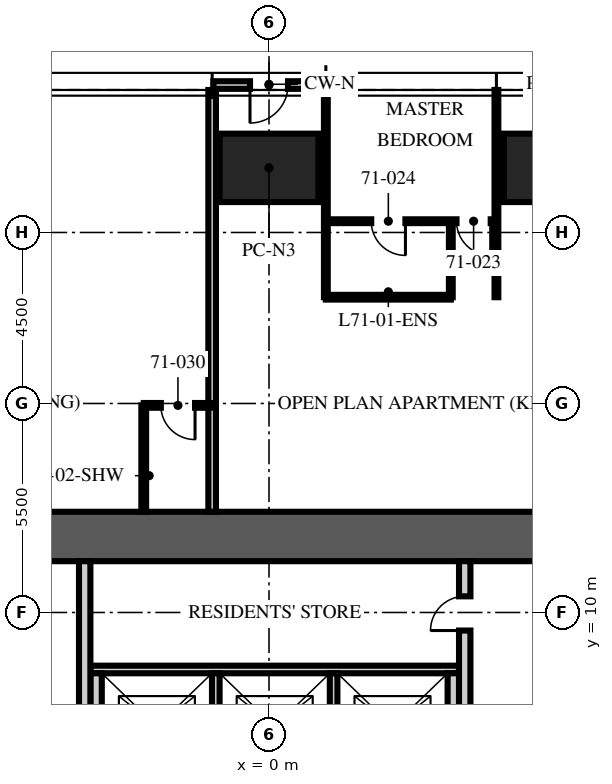
"""IFC4 building model, lengths in metres.
Left out: names, types, materials, properties, quantities, classifications, styles, units other than length and angle.
Written with IfcOpenShell. Run it as: python <this file> out.ifc"""

import sys

from ifc_helpers import new_model, si_unit, direction, frame, frame_2d, origin, origin_2d, place, context, subcontext, project, spatial, rectangle, extrude, element, fill, save


model = new_model("IFC4")
c1 = context("Model", 3, precision=1e-05, world=origin(), true_north=direction((0.0, 1.0)))
c2 = subcontext(c1, "Body", "Model", "MODEL_VIEW")
j1 = project(units=[si_unit("LENGTHUNIT", "METRE"), si_unit("PLANEANGLEUNIT", "RADIAN")], contexts=[c1])
p1 = place(None, origin())
s1 = spatial("IfcSite", under=j1, at=p1, CompositionType="ELEMENT")
p2 = place(p1, origin())
s2 = spatial("IfcBuilding", under=s1, at=p2, CompositionType="ELEMENT")
p3 = place(p2, frame((0.0, 0.0, 285.75)))
s3 = spatial("IfcBuildingStorey", under=s2, at=p3, CompositionType="ELEMENT", Elevation=285.75)
p4 = place(p3, frame((-15.5, 12.0, -0.25), z_axis=(0.0, 0.0, 1.0), x_axis=(1.0, 0.0, 0.0)))
e1 = element("IfcWall", 1, at=p4, inside=s3, PredefinedType="SHEAR", context=c2, shape_type="SweptSolid", body=[
    extrude(rectangle(XDim=31.0, YDim=1.3, at=frame_2d((15.5, 0.0))), origin(), (0.0, 0.0, 1.0), 3.75),
])
p5 = place(p3, frame((0.0, 21.7, -0.23), z_axis=(0.0, 0.0, 1.0), x_axis=(1.0, 0.0, 0.0)))
e2 = element("IfcColumn", 2, at=p5, inside=s3, PredefinedType="COLUMN", context=c2, shape_type="SweptSolid", body=[
    extrude(rectangle(XDim=2.6, YDim=1.8, at=origin_2d()), origin(), (0.0, 0.0, 1.0), 3.98),
])
p6 = place(p3, frame((7.48, 21.7, -0.09), z_axis=(0.0, 0.0, 1.0), x_axis=(1.0, 0.0, 0.0)))
e3 = element("IfcColumn", 3, at=p6, inside=s3, PredefinedType="COLUMN", context=c2, shape_type="SweptSolid", body=[
    extrude(rectangle(XDim=2.6, YDim=1.8, at=origin_2d()), origin(), (0.0, 0.0, 1.0), 3.84),
])
p7 = place(p3, frame((1.463, 23.88, 0.0), z_axis=(0.0, 0.0, 1.0), x_axis=(-1.0, 0.0, 0.0)))
e4 = element("IfcWall", 4, at=p7, inside=s3, PredefinedType="ELEMENTEDWALL", context=c2, shape_type="SweptSolid", body=[
    extrude(rectangle(XDim=2.927, YDim=0.2, at=frame_2d((1.463, 0.0))), origin(), (0.0, 0.0, 1.0), 3.75),
])
p8 = place(p7, frame((0.963, 0.0, 0.0)))
e5 = element("IfcOpeningElement", 5, at=p8, cuts=e4, PredefinedType="OPENING", context=c2, shape_type="SweptSolid", body=[
    extrude(rectangle(XDim=1.0, YDim=2.4, at=frame_2d((0.5, 1.2))), frame((0.0, 0.11, 0.0), z_axis=(0.0, -1.0, 0.0), x_axis=(1.0, 0.0, 0.0)), (0.0, 0.0, 1.0), 0.22),
])
p9 = place(p3, frame((-4.7, 8.5, 0.0), z_axis=(0.0, 0.0, 1.0), x_axis=(1.0, 0.0, 0.0)))
e6 = element("IfcWall", 6, at=p9, inside=s3, PredefinedType="PARTITIONING", context=c2, shape_type="SweptSolid", body=[
    extrude(rectangle(XDim=9.7, YDim=0.2, at=frame_2d((4.85, 0.0))), origin(), (0.0, 0.0, 1.0), 3.5),
])
for number, where, z_axis, x_axis in (
    (7, (-4.55, 5.6, 0.0), (0.0, 0.0, 1.0), (0.0, 1.0, 0.0)),
    (8, (4.85, 5.6, 0.0), (0.0, 0.0, 1.0), (0.0, 1.0, 0.0)),
):
    element("IfcWall", number, at=place(p3, frame(where, z_axis=z_axis, x_axis=x_axis)), inside=s3, PredefinedType="PARTITIONING", context=c2, shape_type="SweptSolid", body=[
        extrude(rectangle(XDim=2.8, YDim=0.3, at=frame_2d((1.4, 0.0))), origin(), (0.0, 0.0, 1.0), 3.5),
    ])
for number, where, z_axis, x_axis in (
    (9, (-1.4, 5.6, 0.0), (0.0, 0.0, 1.0), (0.0, 1.0, 0.0)),
    (10, (1.7, 5.6, 0.0), (0.0, 0.0, 1.0), (0.0, 1.0, 0.0)),
):
    element("IfcWall", number, at=place(p3, frame(where, z_axis=z_axis, x_axis=x_axis)), inside=s3, PredefinedType="PARTITIONING", context=c2, shape_type="SweptSolid", body=[
        extrude(rectangle(XDim=2.8, YDim=0.2, at=frame_2d((1.4, 0.0))), origin(), (0.0, 0.0, 1.0), 3.5),
    ])
p10 = place(p3, frame((-4.85, 5.3, 0.0), z_axis=(0.0, 0.0, 1.0), x_axis=(0.0, 1.0, 0.0)))
e11 = element("IfcWall", 11, at=p10, inside=s3, PredefinedType="PARTITIONING", context=c2, shape_type="SweptSolid", body=[
    extrude(rectangle(XDim=6.05, YDim=0.3, at=frame_2d((3.025, 0.0))), origin(), (0.0, 0.0, 1.0), 3.5),
])
p11 = place(p3, frame((5.15, 5.3, 0.0), z_axis=(0.0, 0.0, 1.0), x_axis=(0.0, 1.0, 0.0)))
e12 = element("IfcWall", 12, at=p11, inside=s3, PredefinedType="PARTITIONING", context=c2, shape_type="SweptSolid", body=[
    extrude(rectangle(XDim=6.05, YDim=0.3, at=frame_2d((3.025, 0.0))), origin(), (0.0, 0.0, 1.0), 3.5),
])
p12 = place(p11, frame((4.225, 0.0, 0.0)))
e13 = element("IfcOpeningElement", 13, at=p12, cuts=e12, PredefinedType="OPENING", context=c2, shape_type="SweptSolid", body=[
    extrude(rectangle(XDim=0.9, YDim=2.1, at=frame_2d((0.45, 1.05))), frame((0.0, 0.16, 0.0), z_axis=(0.0, -1.0, 0.0), x_axis=(1.0, 0.0, 0.0)), (0.0, 0.0, 1.0), 0.32),
])
for number, where, z_axis, x_axis in (
    (14, (5.984, 18.296, 0.0), (0.0, 0.0, 1.0), (0.0, 1.0, 0.0)),
    (15, (1.496, 18.296, 0.0), (0.0, 0.0, 1.0), (0.0, 1.0, 0.0)),
):
    element("IfcWall", number, at=place(p3, frame(where, z_axis=z_axis, x_axis=x_axis)), inside=s3, PredefinedType="PARTITIONING", context=c2, shape_type="SweptSolid", body=[
        extrude(rectangle(XDim=5.454, YDim=0.1, at=frame_2d((2.727, 0.0))), origin(), (0.0, 0.0, 1.0), 3.01),
    ])
p13 = place(p3, frame((-1.496, 12.65, 0.0), z_axis=(0.0, 0.0, 1.0), x_axis=(0.0, 1.0, 0.0)))
e16 = element("IfcWall", 16, at=p13, inside=s3, PredefinedType="PARTITIONING", context=c2, shape_type="SweptSolid", body=[
    extrude(rectangle(XDim=11.1, YDim=0.2, at=frame_2d((5.55, 0.0))), origin(), (0.0, 0.0, 1.0), 3.01),
])
p14 = place(p3, frame((5.984, 20.296, 0.0), z_axis=(0.0, 0.0, 1.0), x_axis=(-1.0, 0.0, 0.0)))
e17 = element("IfcWall", 17, at=p14, inside=s3, PredefinedType="PARTITIONING", context=c2, shape_type="SweptSolid", body=[
    extrude(rectangle(XDim=4.488, YDim=0.1, at=frame_2d((2.244, 0.0))), origin(), (0.0, 0.0, 1.0), 2.91),
])
p15 = place(p14, frame((0.15, 0.0, 0.0)))
e18 = element("IfcOpeningElement", 18, at=p15, cuts=e17, PredefinedType="OPENING", context=c2, shape_type="SweptSolid", body=[
    extrude(rectangle(XDim=0.9, YDim=2.1, at=frame_2d((0.45, 1.05))), frame((0.0, 0.06, 0.0), z_axis=(0.0, -1.0, 0.0), x_axis=(1.0, 0.0, 0.0)), (0.0, 0.0, 1.0), 0.12),
])
p16 = place(p14, frame((2.394, 0.0, 0.0)))
e19 = element("IfcOpeningElement", 19, at=p16, cuts=e17, PredefinedType="OPENING", context=c2, shape_type="SweptSolid", body=[
    extrude(rectangle(XDim=0.9, YDim=2.1, at=frame_2d((0.45, 1.05))), frame((0.0, 0.06, 0.0), z_axis=(0.0, -1.0, 0.0), x_axis=(1.0, 0.0, 0.0)), (0.0, 0.0, 1.0), 0.12),
])
p17 = place(p3, frame((4.784, 18.296, 0.0), z_axis=(0.0, 0.0, 1.0), x_axis=(0.0, 1.0, 0.0)))
e20 = element("IfcWall", 20, at=p17, inside=s3, PredefinedType="PARTITIONING", context=c2, shape_type="SweptSolid", body=[
    extrude(rectangle(XDim=2.0, YDim=0.1, at=frame_2d((1.0, 0.0))), origin(), (0.0, 0.0, 1.0), 3.5),
])
p18 = place(p3, frame((4.784, 18.296, 0.0), z_axis=(0.0, 0.0, 1.0), x_axis=(-1.0, 0.0, 0.0)))
e21 = element("IfcWall", 21, at=p18, inside=s3, PredefinedType="PARTITIONING", context=c2, shape_type="SweptSolid", body=[
    extrude(rectangle(XDim=3.288, YDim=0.125, at=frame_2d((1.644, 0.0))), origin(), (0.0, 0.0, 1.0), 2.91),
])
p19 = place(p3, frame((-1.496, 15.45, 0.0), z_axis=(0.0, 0.0, 1.0), x_axis=(-1.0, 0.0, 0.0)))
e22 = element("IfcWall", 22, at=p19, inside=s3, PredefinedType="PARTITIONING", context=c2, shape_type="SweptSolid", body=[
    extrude(rectangle(XDim=1.8, YDim=0.125, at=frame_2d((0.9, 0.0))), origin(), (0.0, 0.0, 1.0), 3.5),
])
p20 = place(p19, frame((0.45, 0.0, 0.0)))
e23 = element("IfcOpeningElement", 23, at=p20, cuts=e22, PredefinedType="OPENING", context=c2, shape_type="SweptSolid", body=[
    extrude(rectangle(XDim=0.9, YDim=2.1, at=frame_2d((0.45, 1.05))), frame((0.0, 0.073, 0.0), z_axis=(0.0, -1.0, 0.0), x_axis=(1.0, 0.0, 0.0)), (0.0, 0.0, 1.0), 0.145),
])
p21 = place(p3, frame((-3.296, 12.65, 0.0), z_axis=(0.0, 0.0, 1.0), x_axis=(0.0, 1.0, 0.0)))
e24 = element("IfcWall", 24, at=p21, inside=s3, PredefinedType="PARTITIONING", context=c2, shape_type="SweptSolid", body=[
    extrude(rectangle(XDim=2.8, YDim=0.125, at=frame_2d((1.4, 0.0))), origin(), (0.0, 0.0, 1.0), 3.5),
])
p22 = place(p8, origin())
e25 = element("IfcDoor", 25, at=p22, inside=s3, OperationType="SINGLE_SWING_LEFT", PredefinedType="DOOR", context=c2, shape_type="SweptSolid", body=[
    extrude(rectangle(XDim=1.0, YDim=2.4, at=frame_2d((0.5, 1.2))), frame((0.0, 0.025, 0.0), z_axis=(0.0, -1.0, 0.0), x_axis=(1.0, 0.0, 0.0)), (0.0, 0.0, 1.0), 0.05),
])
fill(e5, e25)
p23 = place(p12, origin())
e26 = element("IfcDoor", 26, at=p23, inside=s3, OperationType="SINGLE_SWING_LEFT", PredefinedType="DOOR", context=c2, shape_type="SweptSolid", body=[
    extrude(rectangle(XDim=0.9, YDim=2.1, at=frame_2d((0.45, 1.05))), frame((0.0, 0.025, 0.0), z_axis=(0.0, -1.0, 0.0), x_axis=(1.0, 0.0, 0.0)), (0.0, 0.0, 1.0), 0.05),
])
fill(e13, e26)
p24 = place(p15, origin())
e27 = element("IfcDoor", 27, at=p24, inside=s3, OperationType="SINGLE_SWING_LEFT", PredefinedType="DOOR", context=c2, shape_type="SweptSolid", body=[
    extrude(rectangle(XDim=0.9, YDim=2.1, at=frame_2d((0.45, 1.05))), frame((0.0, 0.025, 0.0), z_axis=(0.0, -1.0, 0.0), x_axis=(1.0, 0.0, 0.0)), (0.0, 0.0, 1.0), 0.05),
])
fill(e18, e27)
p25 = place(p16, origin())
e28 = element("IfcDoor", 28, at=p25, inside=s3, OperationType="SINGLE_SWING_LEFT", PredefinedType="DOOR", context=c2, shape_type="SweptSolid", body=[
    extrude(rectangle(XDim=0.9, YDim=2.1, at=frame_2d((0.45, 1.05))), frame((0.0, 0.025, 0.0), z_axis=(0.0, -1.0, 0.0), x_axis=(1.0, 0.0, 0.0)), (0.0, 0.0, 1.0), 0.05),
])
fill(e19, e28)
p26 = place(p20, origin())
e29 = element("IfcDoor", 29, at=p26, inside=s3, OperationType="SINGLE_SWING_LEFT", PredefinedType="DOOR", context=c2, shape_type="SweptSolid", body=[
    extrude(rectangle(XDim=0.9, YDim=2.1, at=frame_2d((0.45, 1.05))), frame((0.0, 0.025, 0.0), z_axis=(0.0, -1.0, 0.0), x_axis=(1.0, 0.0, 0.0)), (0.0, 0.0, 1.0), 0.05),
])
fill(e23, e29)
save(model, sys.argv[1])
